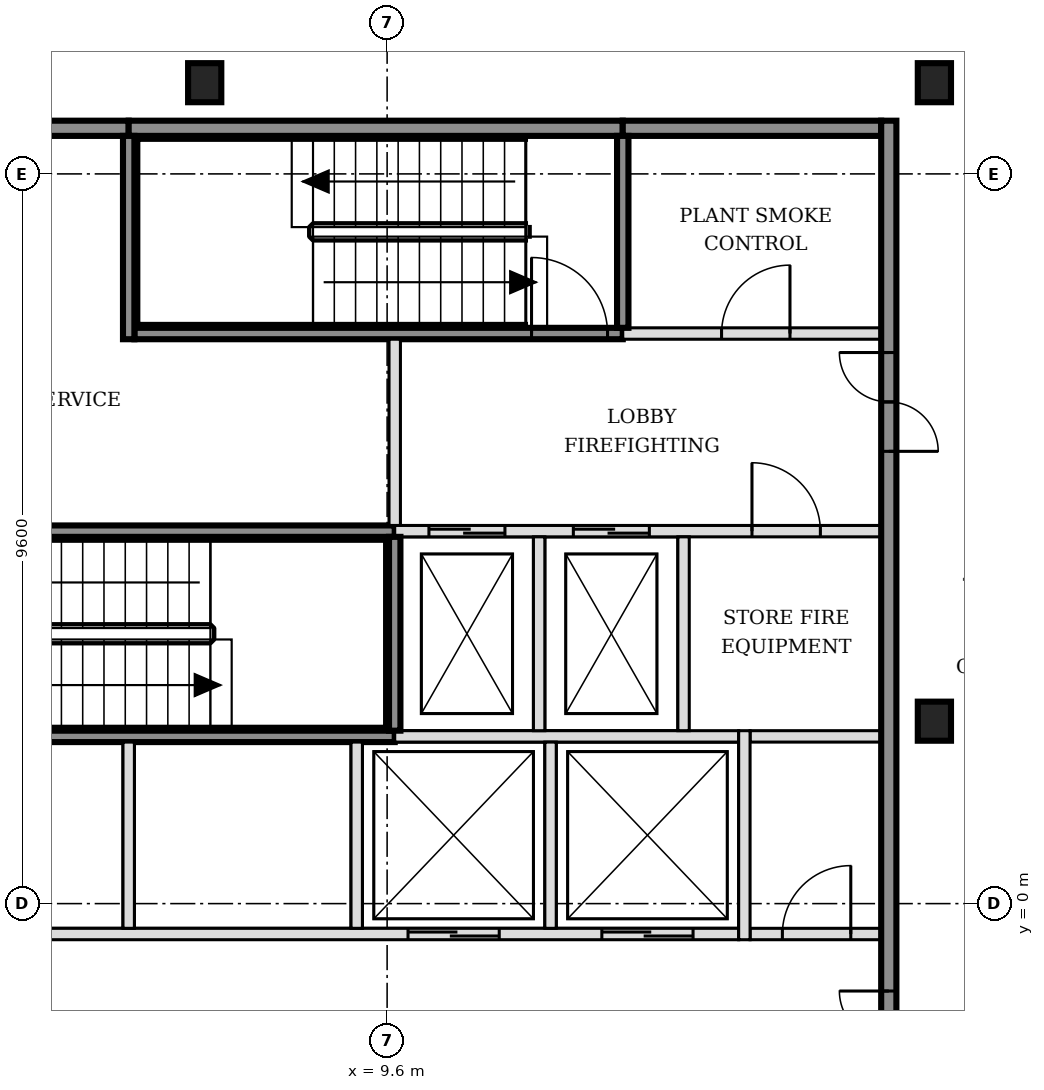
"""IFC4 building model, lengths in metres.
Left out: names, types, materials, properties, quantities, classifications, styles, units other than length and angle.
Written with IfcOpenShell. Run it as: python <this file> out.ifc"""

import sys

from ifc_helpers import new_model, si_unit, direction, frame, frame_2d, origin, origin_2d, place, context, subcontext, project, spatial, rectangle, i_section, extrude, element, fill, save


model = new_model("IFC4")
c1 = context("Model", 3, precision=1e-05, world=origin(), true_north=direction((0.0, 1.0)))
c2 = subcontext(c1, "Body", "Model", "MODEL_VIEW")
j1 = project(units=[si_unit("LENGTHUNIT", "METRE"), si_unit("PLANEANGLEUNIT", "RADIAN")], contexts=[c1])
p1 = place(None, origin())
s1 = spatial("IfcSite", under=j1, at=p1, CompositionType="ELEMENT")
p2 = place(p1, origin())
s2 = spatial("IfcBuilding", under=s1, at=p2, CompositionType="ELEMENT")
p3 = place(p2, frame((0.0, 0.0, 69.0)))
s3 = spatial("IfcBuildingStorey", under=s2, at=p3, CompositionType="ELEMENT", Elevation=69.0)
for number, where, z_axis, x_axis in (
    (1, (16.8, 2.4, -0.15), (0.0, 0.0, 1.0), (1.0, 0.0, 0.0)),
    (2, (7.2, 10.8, -0.15), (0.0, 0.0, 1.0), (1.0, 0.0, 0.0)),
    (3, (16.8, 10.8, -0.15), (0.0, 0.0, 1.0), (1.0, 0.0, 0.0)),
):
    element("IfcColumn", number, at=place(p3, frame(where, z_axis=z_axis, x_axis=x_axis)), inside=s3, PredefinedType="COLUMN", context=c2, shape_type="SweptSolid", body=[
        extrude(i_section(OverallWidth=0.437, OverallDepth=0.514, WebThickness=0.061, FlangeThickness=0.097, FilletRadius=0.015, at=origin_2d()), origin(), (0.0, 0.0, 1.0), 3.6),
    ])
p4 = place(p3, frame((-1.7, -0.4, 0.0), z_axis=(0.0, 0.0, 1.0), x_axis=(1.0, 0.0, 0.0)))
e4 = element("IfcWall", 4, at=p4, inside=s3, PredefinedType="SOLIDWALL", context=c2, shape_type="SweptSolid", body=[
    extrude(rectangle(XDim=15.925, YDim=0.15, at=frame_2d((7.962, 0.0))), origin(), (0.0, 0.0, 1.0), 3.45),
])
p5 = place(p4, frame((0.6, 0.0, 0.0)))
e5 = element("IfcOpeningElement", 5, at=p5, cuts=e4, PredefinedType="OPENING", context=c2, shape_type="SweptSolid", body=[
    extrude(rectangle(XDim=1.1, YDim=2.1, at=frame_2d((0.55, 1.05))), frame((0.0, 0.085, 0.0), z_axis=(0.0, -1.0, 0.0), x_axis=(1.0, 0.0, 0.0)), (0.0, 0.0, 1.0), 0.17),
])
p6 = place(p4, frame((3.1, 0.0, 0.0)))
e6 = element("IfcOpeningElement", 6, at=p6, cuts=e4, PredefinedType="OPENING", context=c2, shape_type="SweptSolid", body=[
    extrude(rectangle(XDim=1.1, YDim=2.1, at=frame_2d((0.55, 1.05))), frame((0.0, 0.085, 0.0), z_axis=(0.0, -1.0, 0.0), x_axis=(1.0, 0.0, 0.0)), (0.0, 0.0, 1.0), 0.17),
])
p7 = place(p4, frame((11.575, 0.0, 0.0)))
e7 = element("IfcOpeningElement", 7, at=p7, cuts=e4, PredefinedType="OPENING", context=c2, shape_type="SweptSolid", body=[
    extrude(rectangle(XDim=1.2, YDim=2.1, at=frame_2d((0.6, 1.05))), frame((0.0, 0.085, 0.0), z_axis=(0.0, -1.0, 0.0), x_axis=(1.0, 0.0, 0.0)), (0.0, 0.0, 1.0), 0.17),
])
p8 = place(p4, frame((14.125, 0.0, 0.0)))
e8 = element("IfcOpeningElement", 8, at=p8, cuts=e4, PredefinedType="OPENING", context=c2, shape_type="SweptSolid", body=[
    extrude(rectangle(XDim=1.2, YDim=2.1, at=frame_2d((0.6, 1.05))), frame((0.0, 0.085, 0.0), z_axis=(0.0, -1.0, 0.0), x_axis=(1.0, 0.0, 0.0)), (0.0, 0.0, 1.0), 0.17),
])
p9 = place(p3, frame((14.375, -0.4, 0.0), z_axis=(0.0, 0.0, 1.0), x_axis=(1.0, 0.0, 0.0)))
e9 = element("IfcWall", 9, at=p9, inside=s3, PredefinedType="PARTITIONING", context=c2, shape_type="SweptSolid", body=[
    extrude(rectangle(XDim=1.725, YDim=0.15, at=frame_2d((0.863, 0.0))), origin(), (0.0, 0.0, 1.0), 3.45),
])
p10 = place(p9, frame((0.425, 0.0, 0.0)))
e10 = element("IfcOpeningElement", 10, at=p10, cuts=e9, PredefinedType="OPENING", context=c2, shape_type="SweptSolid", body=[
    extrude(rectangle(XDim=0.9, YDim=2.1, at=frame_2d((0.45, 1.05))), frame((0.0, 0.085, 0.0), z_axis=(0.0, -1.0, 0.0), x_axis=(1.0, 0.0, 0.0)), (0.0, 0.0, 1.0), 0.17),
])
p11 = place(p3, frame((3.2, 2.2, 0.0), z_axis=(0.0, 0.0, 1.0), x_axis=(1.0, 0.0, 0.0)))
e11 = element("IfcWall", 11, at=p11, inside=s3, PredefinedType="SOLIDWALL", context=c2, shape_type="SweptSolid", body=[
    extrude(rectangle(XDim=6.5, YDim=0.15, at=frame_2d((3.25, 0.0))), origin(), (0.0, 0.0, 1.0), 3.45),
])
p12 = place(p3, frame((9.7, 2.2, 0.0), z_axis=(0.0, 0.0, 1.0), x_axis=(1.0, 0.0, 0.0)))
e12 = element("IfcWall", 12, at=p12, inside=s3, PredefinedType="SOLIDWALL", context=c2, shape_type="SweptSolid", body=[
    extrude(rectangle(XDim=4.525, YDim=0.15, at=frame_2d((2.263, 0.0))), origin(), (0.0, 0.0, 1.0), 3.45),
])
p13 = place(p3, frame((14.375, 2.2, 0.0), z_axis=(0.0, 0.0, 1.0), x_axis=(1.0, 0.0, 0.0)))
e13 = element("IfcWall", 13, at=p13, inside=s3, PredefinedType="PARTITIONING", context=c2, shape_type="SweptSolid", body=[
    extrude(rectangle(XDim=1.725, YDim=0.15, at=frame_2d((0.863, 0.0))), origin(), (0.0, 0.0, 1.0), 3.45),
])
p14 = place(p3, frame((3.275, 4.9, 0.0), z_axis=(0.0, 0.0, 1.0), x_axis=(1.0, 0.0, 0.0)))
e14 = element("IfcWall", 14, at=p14, inside=s3, PredefinedType="SOLIDWALL", context=c2, shape_type="SweptSolid", body=[
    extrude(rectangle(XDim=6.425, YDim=0.15, at=frame_2d((3.212, 0.0))), origin(), (0.0, 0.0, 1.0), 3.45),
])
p15 = place(p14, frame((0.1, 0.0, 0.0)))
e15 = element("IfcOpeningElement", 15, at=p15, cuts=e14, PredefinedType="OPENING", context=c2, shape_type="SweptSolid", body=[
    extrude(rectangle(XDim=1.0, YDim=2.1, at=frame_2d((0.5, 1.05))), frame((0.0, 0.085, 0.0), z_axis=(0.0, -1.0, 0.0), x_axis=(1.0, 0.0, 0.0)), (0.0, 0.0, 1.0), 0.17),
])
p16 = place(p3, frame((9.7, 4.9, 0.0), z_axis=(0.0, 0.0, 1.0), x_axis=(1.0, 0.0, 0.0)))
e16 = element("IfcWall", 16, at=p16, inside=s3, PredefinedType="SOLIDWALL", context=c2, shape_type="SweptSolid", body=[
    extrude(rectangle(XDim=6.4, YDim=0.15, at=frame_2d((3.2, 0.0))), origin(), (0.0, 0.0, 1.0), 3.45),
])
p17 = place(p16, frame((0.45, 0.0, 0.0)))
e17 = element("IfcOpeningElement", 17, at=p17, cuts=e16, PredefinedType="OPENING", context=c2, shape_type="SweptSolid", body=[
    extrude(rectangle(XDim=1.0, YDim=2.1, at=frame_2d((0.5, 1.05))), frame((0.0, 0.085, 0.0), z_axis=(0.0, -1.0, 0.0), x_axis=(1.0, 0.0, 0.0)), (0.0, 0.0, 1.0), 0.17),
])
p18 = place(p16, frame((2.35, 0.0, 0.0)))
e18 = element("IfcOpeningElement", 18, at=p18, cuts=e16, PredefinedType="OPENING", context=c2, shape_type="SweptSolid", body=[
    extrude(rectangle(XDim=1.0, YDim=2.1, at=frame_2d((0.5, 1.05))), frame((0.0, 0.085, 0.0), z_axis=(0.0, -1.0, 0.0), x_axis=(1.0, 0.0, 0.0)), (0.0, 0.0, 1.0), 0.17),
])
p19 = place(p16, frame((4.7, 0.0, 0.0)))
e19 = element("IfcOpeningElement", 19, at=p19, cuts=e16, PredefinedType="OPENING", context=c2, shape_type="SweptSolid", body=[
    extrude(rectangle(XDim=0.9, YDim=2.1, at=frame_2d((0.45, 1.05))), frame((0.0, 0.085, 0.0), z_axis=(0.0, -1.0, 0.0), x_axis=(1.0, 0.0, 0.0)), (0.0, 0.0, 1.0), 0.17),
])
p20 = place(p3, frame((6.275, 7.5, 0.0), z_axis=(0.0, 0.0, 1.0), x_axis=(1.0, 0.0, 0.0)))
e20 = element("IfcWall", 20, at=p20, inside=s3, PredefinedType="SOLIDWALL", context=c2, shape_type="SweptSolid", body=[
    extrude(rectangle(XDim=6.425, YDim=0.15, at=frame_2d((3.212, 0.0))), origin(), (0.0, 0.0, 1.0), 3.45),
])
p21 = place(p20, frame((5.225, 0.0, 0.0)))
e21 = element("IfcOpeningElement", 21, at=p21, cuts=e20, PredefinedType="OPENING", context=c2, shape_type="SweptSolid", body=[
    extrude(rectangle(XDim=1.0, YDim=2.1, at=frame_2d((0.5, 1.05))), frame((0.0, 0.085, 0.0), z_axis=(0.0, -1.0, 0.0), x_axis=(1.0, 0.0, 0.0)), (0.0, 0.0, 1.0), 0.17),
])
p22 = place(p3, frame((12.7, 7.5, 0.0), z_axis=(0.0, 0.0, 1.0), x_axis=(1.0, 0.0, 0.0)))
e22 = element("IfcWall", 22, at=p22, inside=s3, PredefinedType="SOLIDWALL", context=c2, shape_type="SweptSolid", body=[
    extrude(rectangle(XDim=3.4, YDim=0.15, at=frame_2d((1.7, 0.0))), origin(), (0.0, 0.0, 1.0), 3.45),
])
p23 = place(p22, frame((1.3, 0.0, 0.0)))
e23 = element("IfcOpeningElement", 23, at=p23, cuts=e22, PredefinedType="OPENING", context=c2, shape_type="SweptSolid", body=[
    extrude(rectangle(XDim=0.9, YDim=2.1, at=frame_2d((0.45, 1.05))), frame((0.0, 0.085, 0.0), z_axis=(0.0, -1.0, 0.0), x_axis=(1.0, 0.0, 0.0)), (0.0, 0.0, 1.0), 0.17),
])
p24 = place(p3, frame((-1.7, 10.2, 0.0), z_axis=(0.0, 0.0, 1.0), x_axis=(1.0, 0.0, 0.0)))
e24 = element("IfcWall", 24, at=p24, inside=s3, PredefinedType="SOLIDWALL", context=c2, shape_type="SweptSolid", body=[
    extrude(rectangle(XDim=7.9, YDim=0.2, at=frame_2d((3.95, 0.0))), origin(), (0.0, 0.0, 1.0), 3.45),
])
p25 = place(p3, frame((6.2, 10.2, 0.0), z_axis=(0.0, 0.0, 1.0), x_axis=(1.0, 0.0, 0.0)))
e25 = element("IfcWall", 25, at=p25, inside=s3, PredefinedType="SOLIDWALL", context=c2, shape_type="SweptSolid", body=[
    extrude(rectangle(XDim=6.5, YDim=0.2, at=frame_2d((3.25, 0.0))), origin(), (0.0, 0.0, 1.0), 3.45),
])
p26 = place(p3, frame((12.7, 10.2, 0.0), z_axis=(0.0, 0.0, 1.0), x_axis=(1.0, 0.0, 0.0)))
e26 = element("IfcWall", 26, at=p26, inside=s3, PredefinedType="SOLIDWALL", context=c2, shape_type="SweptSolid", body=[
    extrude(rectangle(XDim=3.4, YDim=0.2, at=frame_2d((1.7, 0.0))), origin(), (0.0, 0.0, 1.0), 3.45),
])
p27 = place(p3, frame((6.2, -0.325, 0.0), z_axis=(0.0, 0.0, 1.0), x_axis=(0.0, 1.0, 0.0)))
e27 = element("IfcWall", 27, at=p27, inside=s3, PredefinedType="SOLIDWALL", context=c2, shape_type="SweptSolid", body=[
    extrude(rectangle(XDim=2.45, YDim=0.15, at=frame_2d((1.225, 0.0))), origin(), (0.0, 0.0, 1.0), 3.45),
])
p28 = place(p3, frame((6.2, 7.425, 0.0), z_axis=(0.0, 0.0, 1.0), x_axis=(0.0, 1.0, 0.0)))
e28 = element("IfcWall", 28, at=p28, inside=s3, PredefinedType="SOLIDWALL", context=c2, shape_type="SweptSolid", body=[
    extrude(rectangle(XDim=2.675, YDim=0.15, at=frame_2d((1.337, 0.0))), origin(), (0.0, 0.0, 1.0), 3.45),
])
p29 = place(p3, frame((9.2, -0.325, 0.0), z_axis=(0.0, 0.0, 1.0), x_axis=(0.0, 1.0, 0.0)))
e29 = element("IfcWall", 29, at=p29, inside=s3, PredefinedType="SOLIDWALL", context=c2, shape_type="SweptSolid", body=[
    extrude(rectangle(XDim=2.45, YDim=0.15, at=frame_2d((1.225, 0.0))), origin(), (0.0, 0.0, 1.0), 3.45),
])
p30 = place(p3, frame((9.7, 2.275, 0.0), z_axis=(0.0, 0.0, 1.0), x_axis=(0.0, 1.0, 0.0)))
e30 = element("IfcWall", 30, at=p30, inside=s3, PredefinedType="SOLIDWALL", context=c2, shape_type="SweptSolid", body=[
    extrude(rectangle(XDim=2.55, YDim=0.15, at=frame_2d((1.275, 0.0))), origin(), (0.0, 0.0, 1.0), 3.45),
])
p31 = place(p3, frame((9.7, 4.975, 0.0), z_axis=(0.0, 0.0, 1.0), x_axis=(0.0, 1.0, 0.0)))
e31 = element("IfcWall", 31, at=p31, inside=s3, PredefinedType="SOLIDWALL", context=c2, shape_type="SweptSolid", body=[
    extrude(rectangle(XDim=2.45, YDim=0.15, at=frame_2d((1.225, 0.0))), origin(), (0.0, 0.0, 1.0), 3.45),
])
p32 = place(p3, frame((11.6, 2.275, 0.0), z_axis=(0.0, 0.0, 1.0), x_axis=(0.0, 1.0, 0.0)))
e32 = element("IfcWall", 32, at=p32, inside=s3, PredefinedType="SOLIDWALL", context=c2, shape_type="SweptSolid", body=[
    extrude(rectangle(XDim=2.55, YDim=0.15, at=frame_2d((1.275, 0.0))), origin(), (0.0, 0.0, 1.0), 3.45),
])
p33 = place(p3, frame((11.75, -0.325, 0.0), z_axis=(0.0, 0.0, 1.0), x_axis=(0.0, 1.0, 0.0)))
e33 = element("IfcWall", 33, at=p33, inside=s3, PredefinedType="SOLIDWALL", context=c2, shape_type="SweptSolid", body=[
    extrude(rectangle(XDim=2.45, YDim=0.15, at=frame_2d((1.225, 0.0))), origin(), (0.0, 0.0, 1.0), 3.45),
])
p34 = place(p3, frame((12.7, 7.575, 0.0), z_axis=(0.0, 0.0, 1.0), x_axis=(0.0, 1.0, 0.0)))
e34 = element("IfcWall", 34, at=p34, inside=s3, PredefinedType="SOLIDWALL", context=c2, shape_type="SweptSolid", body=[
    extrude(rectangle(XDim=2.525, YDim=0.15, at=frame_2d((1.263, 0.0))), origin(), (0.0, 0.0, 1.0), 3.45),
])
p35 = place(p3, frame((13.5, 2.275, 0.0), z_axis=(0.0, 0.0, 1.0), x_axis=(0.0, 1.0, 0.0)))
e35 = element("IfcWall", 35, at=p35, inside=s3, PredefinedType="SOLIDWALL", context=c2, shape_type="SweptSolid", body=[
    extrude(rectangle(XDim=2.55, YDim=0.15, at=frame_2d((1.275, 0.0))), origin(), (0.0, 0.0, 1.0), 3.45),
])
p36 = place(p3, frame((14.3, -0.475, 0.0), z_axis=(0.0, 0.0, 1.0), x_axis=(0.0, 1.0, 0.0)))
e36 = element("IfcWall", 36, at=p36, inside=s3, PredefinedType="SOLIDWALL", context=c2, shape_type="SweptSolid", body=[
    extrude(rectangle(XDim=2.75, YDim=0.15, at=frame_2d((1.375, 0.0))), origin(), (0.0, 0.0, 1.0), 3.45),
])
p37 = place(p3, frame((16.2, -5.5, 0.0), z_axis=(0.0, 0.0, 1.0), x_axis=(0.0, 1.0, 0.0)))
e37 = element("IfcWall", 37, at=p37, inside=s3, PredefinedType="SOLIDWALL", context=c2, shape_type="SweptSolid", body=[
    extrude(rectangle(XDim=15.8, YDim=0.2, at=frame_2d((7.9, 0.0))), origin(), (0.0, 0.0, 1.0), 3.45),
])
p38 = place(p37, frame((3.05, 0.0, 0.0)))
e38 = element("IfcOpeningElement", 38, at=p38, cuts=e37, PredefinedType="OPENING", context=c2, shape_type="SweptSolid", body=[
    extrude(rectangle(XDim=1.3, YDim=2.1, at=frame_2d((0.65, 1.05))), frame((0.0, 0.11, 0.0), z_axis=(0.0, -1.0, 0.0), x_axis=(1.0, 0.0, 0.0)), (0.0, 0.0, 1.0), 0.22),
])
p39 = place(p37, frame((11.45, 0.0, 0.0)))
e39 = element("IfcOpeningElement", 39, at=p39, cuts=e37, PredefinedType="OPENING", context=c2, shape_type="SweptSolid", body=[
    extrude(rectangle(XDim=1.3, YDim=2.1, at=frame_2d((0.65, 1.05))), frame((0.0, 0.11, 0.0), z_axis=(0.0, -1.0, 0.0), x_axis=(1.0, 0.0, 0.0)), (0.0, 0.0, 1.0), 0.22),
])
p40 = place(p7, origin())
e40 = element("IfcDoor", 40, at=p40, inside=s3, OperationType="DOUBLE_DOOR_SLIDING", PredefinedType="DOOR", context=c2, shape_type="SweptSolid", body=[
    extrude(rectangle(XDim=1.2, YDim=2.1, at=frame_2d((0.6, 1.05))), frame((0.0, 0.025, 0.0), z_axis=(0.0, -1.0, 0.0), x_axis=(1.0, 0.0, 0.0)), (0.0, 0.0, 1.0), 0.05),
])
fill(e7, e40)
p41 = place(p8, origin())
e41 = element("IfcDoor", 41, at=p41, inside=s3, OperationType="DOUBLE_DOOR_SLIDING", PredefinedType="DOOR", context=c2, shape_type="SweptSolid", body=[
    extrude(rectangle(XDim=1.2, YDim=2.1, at=frame_2d((0.6, 1.05))), frame((0.0, 0.025, 0.0), z_axis=(0.0, -1.0, 0.0), x_axis=(1.0, 0.0, 0.0)), (0.0, 0.0, 1.0), 0.05),
])
fill(e8, e41)
p42 = place(p17, origin())
e42 = element("IfcDoor", 42, at=p42, inside=s3, OperationType="DOUBLE_DOOR_SLIDING", PredefinedType="DOOR", context=c2, shape_type="SweptSolid", body=[
    extrude(rectangle(XDim=1.0, YDim=2.1, at=frame_2d((0.5, 1.05))), frame((0.0, 0.025, 0.0), z_axis=(0.0, -1.0, 0.0), x_axis=(1.0, 0.0, 0.0)), (0.0, 0.0, 1.0), 0.05),
])
fill(e17, e42)
p43 = place(p18, origin())
e43 = element("IfcDoor", 43, at=p43, inside=s3, OperationType="DOUBLE_DOOR_SLIDING", PredefinedType="DOOR", context=c2, shape_type="SweptSolid", body=[
    extrude(rectangle(XDim=1.0, YDim=2.1, at=frame_2d((0.5, 1.05))), frame((0.0, 0.025, 0.0), z_axis=(0.0, -1.0, 0.0), x_axis=(1.0, 0.0, 0.0)), (0.0, 0.0, 1.0), 0.05),
])
fill(e18, e43)
p44 = place(p21, origin())
e44 = element("IfcDoor", 44, at=p44, inside=s3, OperationType="SINGLE_SWING_LEFT", PredefinedType="DOOR", context=c2, shape_type="SweptSolid", body=[
    extrude(rectangle(XDim=1.0, YDim=2.1, at=frame_2d((0.5, 1.05))), frame((0.0, 0.025, 0.0), z_axis=(0.0, -1.0, 0.0), x_axis=(1.0, 0.0, 0.0)), (0.0, 0.0, 1.0), 0.05),
])
fill(e21, e44)
p45 = place(p38, origin())
e45 = element("IfcDoor", 45, at=p45, inside=s3, OperationType="DOUBLE_DOOR_SINGLE_SWING", PredefinedType="DOOR", context=c2, shape_type="SweptSolid", body=[
    extrude(rectangle(XDim=1.3, YDim=2.1, at=frame_2d((0.65, 1.05))), frame((0.0, 0.025, 0.0), z_axis=(0.0, -1.0, 0.0), x_axis=(1.0, 0.0, 0.0)), (0.0, 0.0, 1.0), 0.05),
])
fill(e38, e45)
p46 = place(p39, origin())
e46 = element("IfcDoor", 46, at=p46, inside=s3, OperationType="DOUBLE_DOOR_SINGLE_SWING", PredefinedType="DOOR", context=c2, shape_type="SweptSolid", body=[
    extrude(rectangle(XDim=1.3, YDim=2.1, at=frame_2d((0.65, 1.05))), frame((0.0, 0.025, 0.0), z_axis=(0.0, -1.0, 0.0), x_axis=(1.0, 0.0, 0.0)), (0.0, 0.0, 1.0), 0.05),
])
fill(e39, e46)
p47 = place(p10, origin())
e47 = element("IfcDoor", 47, at=p47, inside=s3, OperationType="SINGLE_SWING_RIGHT", PredefinedType="DOOR", context=c2, shape_type="SweptSolid", body=[
    extrude(rectangle(XDim=0.9, YDim=2.1, at=frame_2d((0.45, 1.05))), frame((0.0, 0.025, 0.0), z_axis=(0.0, -1.0, 0.0), x_axis=(1.0, 0.0, 0.0)), (0.0, 0.0, 1.0), 0.05),
])
fill(e10, e47)
p48 = place(p19, origin())
e48 = element("IfcDoor", 48, at=p48, inside=s3, OperationType="SINGLE_SWING_LEFT", PredefinedType="DOOR", context=c2, shape_type="SweptSolid", body=[
    extrude(rectangle(XDim=0.9, YDim=2.1, at=frame_2d((0.45, 1.05))), frame((0.0, 0.025, 0.0), z_axis=(0.0, -1.0, 0.0), x_axis=(1.0, 0.0, 0.0)), (0.0, 0.0, 1.0), 0.05),
])
fill(e19, e48)
p49 = place(p23, origin())
e49 = element("IfcDoor", 49, at=p49, inside=s3, OperationType="SINGLE_SWING_RIGHT", PredefinedType="DOOR", context=c2, shape_type="SweptSolid", body=[
    extrude(rectangle(XDim=0.9, YDim=2.1, at=frame_2d((0.45, 1.05))), frame((0.0, 0.025, 0.0), z_axis=(0.0, -1.0, 0.0), x_axis=(1.0, 0.0, 0.0)), (0.0, 0.0, 1.0), 0.05),
])
fill(e23, e49)
save(model, sys.argv[1])
